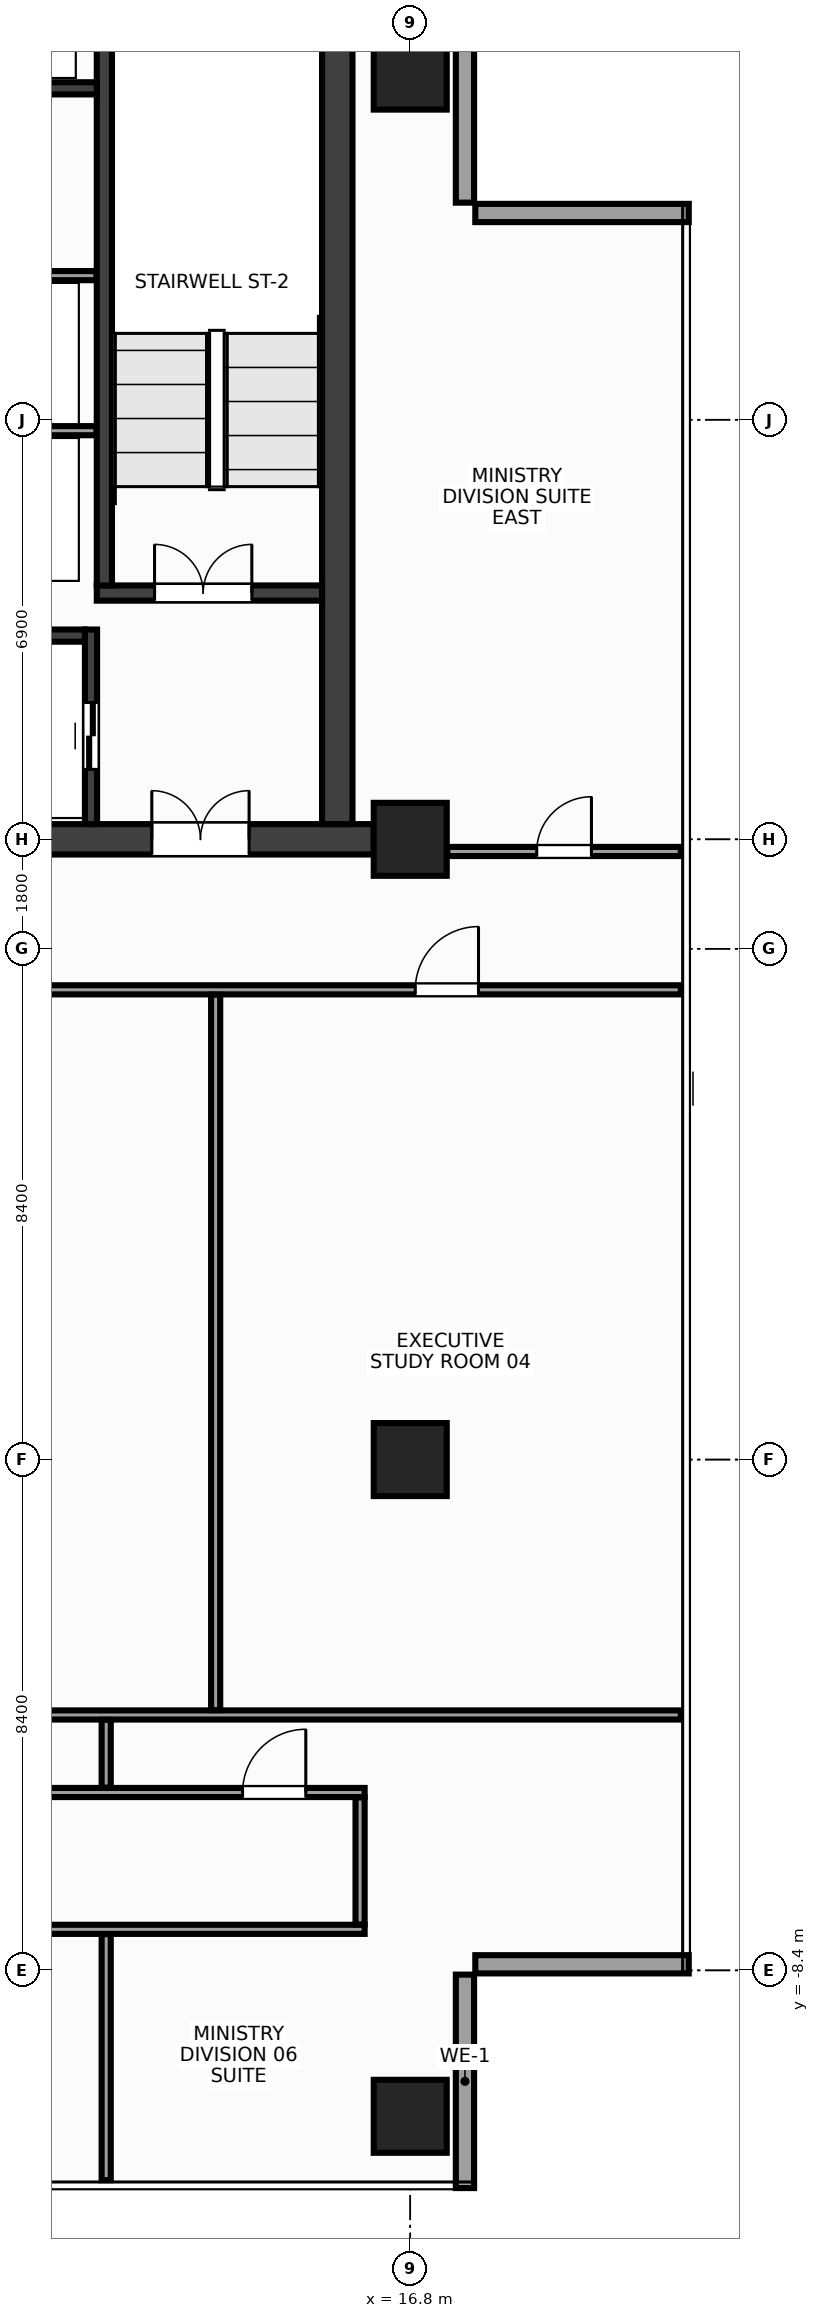
"""IFC4 building model, lengths in metres.
Left out: names, types, materials, properties, quantities, classifications, styles, units other than length and angle.
Written with IfcOpenShell. Run it as: python <this file> out.ifc"""

import sys

from ifc_helpers import new_model, si_unit, direction, frame, frame_2d, origin, origin_2d, place, context, subcontext, project, spatial, rectangle, extrude, source, transform, mapped, element, fill, save


model = new_model("IFC4")
c1 = context("Model", 3, precision=1e-05, world=origin(), true_north=direction((0.0, 1.0)))
c2 = subcontext(c1, "Body", "Model", "MODEL_VIEW")
j1 = project(units=[si_unit("LENGTHUNIT", "METRE"), si_unit("PLANEANGLEUNIT", "RADIAN")], contexts=[c1])
p1 = place(None, origin())
s1 = spatial("IfcSite", under=j1, at=p1, CompositionType="ELEMENT")
p2 = place(p1, origin())
s2 = spatial("IfcBuilding", under=s1, at=p2, CompositionType="ELEMENT")
p3 = place(p2, frame((0.0, 0.0, 282.8)))
s3 = spatial("IfcBuildingStorey", under=s2, at=p3, CompositionType="ELEMENT", Elevation=282.8)
m1 = source(origin(), c2, "Body", "SweptSolid", [
    extrude(rectangle(XDim=32.4, YDim=0.5, at=frame_2d((16.2, 0.0))), origin(), (0.0, 0.0, 1.0), 3.6),
])
p4 = place(p3, frame((-16.2, 10.2, 0.0), z_axis=(0.0, 0.0, 1.0), x_axis=(1.0, 0.0, 0.0)))
e1 = element("IfcWall", 1, at=p4, inside=s3, PredefinedType="SHEAR", context=c2, shape_type="MappedRepresentation", body=[
    mapped(m1, transform((0.0, 0.0, 0.0), x_axis=(1.0, 0.0, 0.0), y_axis=(0.0, 1.0, 0.0), z_axis=(0.0, 0.0, 1.0), scale=1.0)),
])
p5 = place(p4, frame((2.05, 0.0, 0.0)))
e2 = element("IfcOpeningElement", 2, at=p5, cuts=e1, PredefinedType="OPENING", context=c2, shape_type="SweptSolid", body=[
    extrude(rectangle(XDim=1.6, YDim=2.15, at=frame_2d((0.8, 1.075))), frame((0.0, 0.262, 0.0), z_axis=(0.0, -1.0, 0.0), x_axis=(1.0, 0.0, 0.0)), (0.0, 0.0, 1.0), 0.524),
])
p6 = place(p4, frame((28.75, 0.0, 0.0)))
e3 = element("IfcOpeningElement", 3, at=p6, cuts=e1, PredefinedType="OPENING", context=c2, shape_type="SweptSolid", body=[
    extrude(rectangle(XDim=1.6, YDim=2.15, at=frame_2d((0.8, 1.075))), frame((0.0, 0.262, 0.0), z_axis=(0.0, -1.0, 0.0), x_axis=(1.0, 0.0, 0.0)), (0.0, 0.0, 1.0), 0.524),
])
p7 = place(p4, frame((15.45, 0.0, 0.0)))
e4 = element("IfcOpeningElement", 4, at=p7, cuts=e1, PredefinedType="OPENING", context=c2, shape_type="SweptSolid", body=[
    extrude(rectangle(XDim=1.5, YDim=2.2, at=frame_2d((0.75, 1.1))), frame((0.0, 0.262, 0.0), z_axis=(0.0, -1.0, 0.0), x_axis=(1.0, 0.0, 0.0)), (0.0, 0.0, 1.0), 0.524),
])
m2 = source(origin(), c2, "Body", "SweptSolid", [
    extrude(rectangle(XDim=13.1, YDim=0.5, at=frame_2d((6.55, 0.0))), origin(), (0.0, 0.0, 1.0), 3.6),
])
p8 = place(p3, frame((15.6, 10.45, 0.0), z_axis=(0.0, 0.0, 1.0), x_axis=(0.0, 1.0, 0.0)))
e5 = element("IfcWall", 5, at=p8, inside=s3, PredefinedType="SHEAR", context=c2, shape_type="MappedRepresentation", body=[
    mapped(m2, transform((0.0, 0.0, 0.0), x_axis=(1.0, 0.0, 0.0), y_axis=(0.0, 1.0, 0.0), z_axis=(0.0, 0.0, 1.0), scale=1.0)),
])
m3 = source(origin(), c2, "Body", "SweptSolid", [
    extrude(rectangle(XDim=3.705, YDim=0.25, at=frame_2d((1.853, 0.0))), origin(), (0.0, 0.0, 1.0), 3.6),
])
p9 = place(p3, frame((11.645, 14.25, 0.0), z_axis=(0.0, 0.0, 1.0), x_axis=(1.0, 0.0, 0.0)))
e6 = element("IfcWall", 6, at=p9, inside=s3, PredefinedType="SHEAR", context=c2, shape_type="MappedRepresentation", body=[
    mapped(m3, transform((0.0, 0.0, 0.0), x_axis=(1.0, 0.0, 0.0), y_axis=(0.0, 1.0, 0.0), z_axis=(0.0, 0.0, 1.0), scale=1.0)),
])
p10 = place(p9, frame((0.95, 0.0, 0.0)))
e7 = element("IfcOpeningElement", 7, at=p10, cuts=e6, PredefinedType="OPENING", context=c2, shape_type="SweptSolid", body=[
    extrude(rectangle(XDim=1.6, YDim=2.15, at=frame_2d((0.8, 1.075))), frame((0.0, 0.137, 0.0), z_axis=(0.0, -1.0, 0.0), x_axis=(1.0, 0.0, 0.0)), (0.0, 0.0, 1.0), 0.274),
])
m4 = source(origin(), c2, "Body", "SweptSolid", [
    extrude(rectangle(XDim=9.175, YDim=0.25, at=frame_2d((4.587, 0.0))), origin(), (0.0, 0.0, 1.0), 3.6),
])
p11 = place(p3, frame((11.77, 14.375, 0.0), z_axis=(0.0, 0.0, 1.0), x_axis=(0.0, 1.0, 0.0)))
e8 = element("IfcWall", 8, at=p11, inside=s3, PredefinedType="SHEAR", context=c2, shape_type="MappedRepresentation", body=[
    mapped(m4, transform((0.0, 0.0, 0.0), x_axis=(1.0, 0.0, 0.0), y_axis=(0.0, 1.0, 0.0), z_axis=(0.0, 0.0, 1.0), scale=1.0)),
])
m5 = source(origin(), c2, "Body", "SweptSolid", [
    extrude(rectangle(XDim=3.2, YDim=0.2, at=frame_2d((1.6, 0.0))), origin(), (0.0, 0.0, 1.0), 3.6),
])
p12 = place(p3, frame((11.55, 10.45, 0.0), z_axis=(0.0, 0.0, 1.0), x_axis=(0.0, 1.0, 0.0)))
e9 = element("IfcWall", 9, at=p12, inside=s3, PredefinedType="SHEAR", context=c2, shape_type="MappedRepresentation", body=[
    mapped(m5, transform((0.0, 0.0, 0.0), x_axis=(1.0, 0.0, 0.0), y_axis=(0.0, 1.0, 0.0), z_axis=(0.0, 0.0, 1.0), scale=1.0)),
])
p13 = place(p12, frame((0.9, 0.0, 0.0)))
e10 = element("IfcOpeningElement", 10, at=p13, cuts=e9, PredefinedType="OPENING", context=c2, shape_type="SweptSolid", body=[
    extrude(rectangle(XDim=1.1, YDim=2.15, at=frame_2d((0.55, 1.075))), frame((0.0, 0.112, 0.0), z_axis=(0.0, -1.0, 0.0), x_axis=(1.0, 0.0, 0.0)), (0.0, 0.0, 1.0), 0.224),
])
m6 = source(origin(), c2, "Body", "SweptSolid", [
    extrude(rectangle(XDim=2.825, YDim=0.2, at=frame_2d((1.413, 0.0))), origin(), (0.0, 0.0, 1.0), 3.6),
])
p14 = place(p3, frame((8.625, 13.55, 0.0), z_axis=(0.0, 0.0, 1.0), x_axis=(1.0, 0.0, 0.0)))
e11 = element("IfcWall", 11, at=p14, inside=s3, PredefinedType="SHEAR", context=c2, shape_type="MappedRepresentation", body=[
    mapped(m6, transform((0.0, 0.0, 0.0), x_axis=(1.0, 0.0, 0.0), y_axis=(0.0, 1.0, 0.0), z_axis=(0.0, 0.0, 1.0), scale=1.0)),
])
m7 = source(origin(), c2, "Body", "SweptSolid", [
    extrude(rectangle(XDim=3.02, YDim=0.2, at=frame_2d((1.51, 0.0))), origin(), (0.0, 0.0, 1.0), 3.6),
])
p15 = place(p3, frame((8.625, 22.55, 0.0), z_axis=(0.0, 0.0, 1.0), x_axis=(1.0, 0.0, 0.0)))
e12 = element("IfcWall", 12, at=p15, inside=s3, PredefinedType="SHEAR", context=c2, shape_type="MappedRepresentation", body=[
    mapped(m7, transform((0.0, 0.0, 0.0), x_axis=(1.0, 0.0, 0.0), y_axis=(0.0, 1.0, 0.0), z_axis=(0.0, 0.0, 1.0), scale=1.0)),
])
m8 = source(origin(), c2, "Body", "SweptSolid", [
    extrude(rectangle(XDim=1.2, YDim=1.2, at=origin_2d()), origin(), (0.0, 0.0, 1.0), 3.6),
])
for number, where, z_axis, x_axis in (
    (13, (16.8, -10.8, 0.0), (0.0, 0.0, 1.0), (1.0, 0.0, 0.0)),
    (14, (16.8, 0.0, 0.0), (0.0, 0.0, 1.0), (1.0, 0.0, 0.0)),
    (15, (16.8, 10.2, 0.0), (0.0, 0.0, 1.0), (1.0, 0.0, 0.0)),
    (16, (16.8, 22.8, 0.0), (0.0, 0.0, 1.0), (1.0, 0.0, 0.0)),
):
    element("IfcColumn", number, at=place(p3, frame(where, z_axis=z_axis, x_axis=x_axis)), inside=s3, PredefinedType="COLUMN", context=c2, shape_type="MappedRepresentation", body=[
        mapped(m8, transform((0.0, 0.0, 0.0), x_axis=(1.0, 0.0, 0.0), y_axis=(0.0, 1.0, 0.0), z_axis=(0.0, 0.0, 1.0), scale=1.0)),
    ])
m9 = source(origin(), c2, "Body", "SweptSolid", [
    extrude(rectangle(XDim=3.51, YDim=0.3, at=frame_2d((1.755, 0.0))), origin(), (0.0, 0.0, 1.0), 2.75),
])
p16 = place(p3, frame((17.7, -11.98, 0.0), z_axis=(0.0, 0.0, 1.0), x_axis=(0.0, 1.0, 0.0)))
e17 = element("IfcWall", 17, at=p16, inside=s3, PredefinedType="STANDARD", context=c2, shape_type="MappedRepresentation", body=[
    mapped(m9, transform((0.0, 0.0, 0.0), x_axis=(1.0, 0.0, 0.0), y_axis=(0.0, 1.0, 0.0), z_axis=(0.0, 0.0, 1.0), scale=1.0)),
])
m10 = source(origin(), c2, "Body", "SweptSolid", [
    extrude(rectangle(XDim=3.51, YDim=0.3, at=frame_2d((1.755, 0.0))), origin(), (0.0, 0.0, 1.0), 2.75),
])
for number, where, z_axis, x_axis in (
    (18, (17.87, -8.3, 0.0), (0.0, 0.0, 1.0), (1.0, 0.0, 0.0)),
    (19, (21.38, 20.5, 0.0), (0.0, 0.0, 1.0), (-1.0, 0.0, 0.0)),
):
    element("IfcWall", number, at=place(p3, frame(where, z_axis=z_axis, x_axis=x_axis)), inside=s3, PredefinedType="STANDARD", context=c2, shape_type="MappedRepresentation", body=[
        mapped(m10, transform((0.0, 0.0, 0.0), x_axis=(1.0, 0.0, 0.0), y_axis=(0.0, 1.0, 0.0), z_axis=(0.0, 0.0, 1.0), scale=1.0)),
    ])
p17 = place(p3, frame((17.7, 20.67, 0.0), z_axis=(0.0, 0.0, 1.0), x_axis=(0.0, 1.0, 0.0)))
e20 = element("IfcWall", 20, at=p17, inside=s3, PredefinedType="STANDARD", context=c2, shape_type="MappedRepresentation", body=[
    mapped(m9, transform((0.0, 0.0, 0.0), x_axis=(1.0, 0.0, 0.0), y_axis=(0.0, 1.0, 0.0), z_axis=(0.0, 0.0, 1.0), scale=1.0)),
])
m11 = source(origin(), c2, "Body", "SweptSolid", [
    extrude(rectangle(XDim=3.01, YDim=0.15, at=frame_2d((1.505, 0.0))), origin(), (0.0, 0.0, 1.0), 3.37),
])
for number, where, z_axis, x_axis in (
    (21, (8.63, 16.92, 0.0), (0.0, 0.0, 1.0), (1.0, 0.0, 0.0)),
    (22, (8.63, 19.47, 0.0), (0.0, 0.0, 1.0), (1.0, 0.0, 0.0)),
):
    element("IfcWall", number, at=place(p3, frame(where, z_axis=z_axis, x_axis=x_axis)), inside=s3, PredefinedType="PARTITIONING", context=c2, shape_type="MappedRepresentation", body=[
        mapped(m11, transform((0.0, 0.0, 0.0), x_axis=(1.0, 0.0, 0.0), y_axis=(0.0, 1.0, 0.0), z_axis=(0.0, 0.0, 1.0), scale=1.0)),
    ])
m12 = source(origin(), c2, "Body", "SweptSolid", [
    extrude(rectangle(XDim=3.84, YDim=0.15, at=frame_2d((1.92, 0.0))), origin(), (0.0, 0.0, 1.0), 2.805),
])
p18 = place(p3, frame((17.41, 10.0, 0.0), z_axis=(0.0, 0.0, 1.0), x_axis=(1.0, 0.0, 0.0)))
e23 = element("IfcWall", 23, at=p18, inside=s3, PredefinedType="PARTITIONING", context=c2, shape_type="MappedRepresentation", body=[
    mapped(m12, transform((0.0, 0.0, 0.0), x_axis=(1.0, 0.0, 0.0), y_axis=(0.0, 1.0, 0.0), z_axis=(0.0, 0.0, 1.0), scale=1.0)),
])
p19 = place(p18, frame((1.47, 0.0, 0.0)))
e24 = element("IfcOpeningElement", 24, at=p19, cuts=e23, PredefinedType="OPENING", context=c2, shape_type="SweptSolid", body=[
    extrude(rectangle(XDim=0.9, YDim=2.15, at=frame_2d((0.45, 1.075))), frame((0.0, 0.087, 0.0), z_axis=(0.0, -1.0, 0.0), x_axis=(1.0, 0.0, 0.0)), (0.0, 0.0, 1.0), 0.174),
])
m13 = source(origin(), c2, "Body", "SweptSolid", [
    extrude(rectangle(XDim=23.2, YDim=0.15, at=frame_2d((11.6, 0.0))), origin(), (0.0, 0.0, 1.0), 2.755),
])
p20 = place(p3, frame((-1.95, 7.725, 0.0), z_axis=(0.0, 0.0, 1.0), x_axis=(1.0, 0.0, 0.0)))
e25 = element("IfcWall", 25, at=p20, inside=s3, PredefinedType="PARTITIONING", context=c2, shape_type="MappedRepresentation", body=[
    mapped(m13, transform((0.0, 0.0, 0.0), x_axis=(1.0, 0.0, 0.0), y_axis=(0.0, 1.0, 0.0), z_axis=(0.0, 0.0, 1.0), scale=1.0)),
])
p21 = place(p20, frame((7.43, 0.0, 0.0)))
e26 = element("IfcOpeningElement", 26, at=p21, cuts=e25, PredefinedType="OPENING", context=c2, shape_type="SweptSolid", body=[
    extrude(rectangle(XDim=1.04, YDim=2.2, at=frame_2d((0.52, 1.1))), frame((0.0, 0.087, 0.0), z_axis=(0.0, -1.0, 0.0), x_axis=(1.0, 0.0, 0.0)), (0.0, 0.0, 1.0), 0.174),
])
p22 = place(p20, frame((18.833, 0.0, 0.0)))
e27 = element("IfcOpeningElement", 27, at=p22, cuts=e25, PredefinedType="OPENING", context=c2, shape_type="SweptSolid", body=[
    extrude(rectangle(XDim=1.04, YDim=2.2, at=frame_2d((0.52, 1.1))), frame((0.0, 0.087, 0.0), z_axis=(0.0, -1.0, 0.0), x_axis=(1.0, 0.0, 0.0)), (0.0, 0.0, 1.0), 0.174),
])
m14 = source(origin(), c2, "Body", "SweptSolid", [
    extrude(rectangle(XDim=18.0, YDim=0.15, at=frame_2d((9.0, 0.0))), origin(), (0.0, 0.0, 1.0), 2.755),
])
p23 = place(p3, frame((-1.95, -5.475, 0.0), z_axis=(0.0, 0.0, 1.0), x_axis=(1.0, 0.0, 0.0)))
e28 = element("IfcWall", 28, at=p23, inside=s3, PredefinedType="PARTITIONING", context=c2, shape_type="MappedRepresentation", body=[
    mapped(m14, transform((0.0, 0.0, 0.0), x_axis=(1.0, 0.0, 0.0), y_axis=(0.0, 1.0, 0.0), z_axis=(0.0, 0.0, 1.0), scale=1.0)),
])
p24 = place(p23, frame((6.377, 0.0, 0.0)))
e29 = element("IfcOpeningElement", 29, at=p24, cuts=e28, PredefinedType="OPENING", context=c2, shape_type="SweptSolid", body=[
    extrude(rectangle(XDim=1.04, YDim=2.2, at=frame_2d((0.52, 1.1))), frame((0.0, 0.087, 0.0), z_axis=(0.0, -1.0, 0.0), x_axis=(1.0, 0.0, 0.0)), (0.0, 0.0, 1.0), 0.174),
])
p25 = place(p23, frame((15.992, 0.0, 0.0)))
e30 = element("IfcOpeningElement", 30, at=p25, cuts=e28, PredefinedType="OPENING", context=c2, shape_type="SweptSolid", body=[
    extrude(rectangle(XDim=1.04, YDim=2.2, at=frame_2d((0.52, 1.1))), frame((0.0, 0.087, 0.0), z_axis=(0.0, -1.0, 0.0), x_axis=(1.0, 0.0, 0.0)), (0.0, 0.0, 1.0), 0.174),
])
m15 = source(origin(), c2, "Body", "SweptSolid", [
    extrude(rectangle(XDim=32.1, YDim=0.15, at=frame_2d((16.05, 0.0))), origin(), (0.0, 0.0, 1.0), 2.755),
])
p26 = place(p3, frame((-16.05, -7.725, 0.0), z_axis=(0.0, 0.0, 1.0), x_axis=(1.0, 0.0, 0.0)))
e31 = element("IfcWall", 31, at=p26, inside=s3, PredefinedType="PARTITIONING", context=c2, shape_type="MappedRepresentation", body=[
    mapped(m15, transform((0.0, 0.0, 0.0), x_axis=(1.0, 0.0, 0.0), y_axis=(0.0, 1.0, 0.0), z_axis=(0.0, 0.0, 1.0), scale=1.0)),
])
p27 = place(p26, frame((18.83, 0.0, 0.0)))
e32 = element("IfcOpeningElement", 32, at=p27, cuts=e31, PredefinedType="OPENING", context=c2, shape_type="SweptSolid", body=[
    extrude(rectangle(XDim=1.04, YDim=2.2, at=frame_2d((0.52, 1.1))), frame((0.0, 0.087, 0.0), z_axis=(0.0, -1.0, 0.0), x_axis=(1.0, 0.0, 0.0)), (0.0, 0.0, 1.0), 0.174),
])
m16 = source(origin(), c2, "Body", "SweptSolid", [
    extrude(rectangle(XDim=2.09, YDim=0.15, at=frame_2d((1.045, 0.0))), origin(), (0.0, 0.0, 1.0), 3.37),
])
p28 = place(p3, frame((15.975, -7.645, 0.0), z_axis=(0.0, 0.0, 1.0), x_axis=(0.0, 1.0, 0.0)))
e33 = element("IfcWall", 33, at=p28, inside=s3, PredefinedType="PARTITIONING", context=c2, shape_type="MappedRepresentation", body=[
    mapped(m16, transform((0.0, 0.0, 0.0), x_axis=(1.0, 0.0, 0.0), y_axis=(0.0, 1.0, 0.0), z_axis=(0.0, 0.0, 1.0), scale=1.0)),
])
m17 = source(origin(), c2, "Body", "SweptSolid", [
    extrude(rectangle(XDim=23.195, YDim=0.15, at=frame_2d((11.598, 0.0))), origin(), (0.0, 0.0, 1.0), 2.755),
])
p29 = place(p3, frame((-1.945, -4.2, 0.0), z_axis=(0.0, 0.0, 1.0), x_axis=(1.0, 0.0, 0.0)))
e34 = element("IfcWall", 34, at=p29, inside=s3, PredefinedType="PARTITIONING", context=c2, shape_type="MappedRepresentation", body=[
    mapped(m17, transform((0.0, 0.0, 0.0), x_axis=(1.0, 0.0, 0.0), y_axis=(0.0, 1.0, 0.0), z_axis=(0.0, 0.0, 1.0), scale=1.0)),
])
m18 = source(origin(), c2, "Body", "SweptSolid", [
    extrude(rectangle(XDim=11.765, YDim=0.15, at=frame_2d((5.883, 0.0))), origin(), (0.0, 0.0, 1.0), 2.655),
])
p30 = place(p3, frame((13.6, -4.12, 0.0), z_axis=(0.0, 0.0, 1.0), x_axis=(0.0, 1.0, 0.0)))
e35 = element("IfcWall", 35, at=p30, inside=s3, PredefinedType="PARTITIONING", context=c2, shape_type="MappedRepresentation", body=[
    mapped(m18, transform((0.0, 0.0, 0.0), x_axis=(1.0, 0.0, 0.0), y_axis=(0.0, 1.0, 0.0), z_axis=(0.0, 0.0, 1.0), scale=1.0)),
])
m19 = source(origin(), c2, "Body", "SweptSolid", [
    extrude(rectangle(XDim=4.045, YDim=0.15, at=frame_2d((2.022, 0.0))), origin(), (0.0, 0.0, 1.0), 2.905),
])
p31 = place(p3, frame((11.8, -11.85, 0.0), z_axis=(0.0, 0.0, 1.0), x_axis=(0.0, 1.0, 0.0)))
e36 = element("IfcWall", 36, at=p31, inside=s3, PredefinedType="PARTITIONING", context=c2, shape_type="MappedRepresentation", body=[
    mapped(m19, transform((0.0, 0.0, 0.0), x_axis=(1.0, 0.0, 0.0), y_axis=(0.0, 1.0, 0.0), z_axis=(0.0, 0.0, 1.0), scale=1.0)),
])
m20 = source(origin(), c2, "Body", "SweptSolid", [
    extrude(rectangle(XDim=1.115, YDim=0.15, at=frame_2d((0.558, 0.0))), origin(), (0.0, 0.0, 1.0), 3.37),
])
p32 = place(p3, frame((11.8, -5.395, 0.0), z_axis=(0.0, 0.0, 1.0), x_axis=(0.0, 1.0, 0.0)))
e37 = element("IfcWall", 37, at=p32, inside=s3, PredefinedType="PARTITIONING", context=c2, shape_type="MappedRepresentation", body=[
    mapped(m20, transform((0.0, 0.0, 0.0), x_axis=(1.0, 0.0, 0.0), y_axis=(0.0, 1.0, 0.0), z_axis=(0.0, 0.0, 1.0), scale=1.0)),
])
m21 = source(origin(), c2, "Body", "SweptSolid", [
    extrude(rectangle(XDim=1.6, YDim=2.15, at=frame_2d((0.8, 1.075))), frame((0.0, 0.025, 0.0), z_axis=(0.0, -1.0, 0.0), x_axis=(1.0, 0.0, 0.0)), (0.0, 0.0, 1.0), 0.05),
])
p33 = place(p10, origin())
e38 = element("IfcDoor", 38, at=p33, inside=s3, OperationType="DOUBLE_DOOR_SINGLE_SWING", PredefinedType="DOOR", context=c2, shape_type="MappedRepresentation", body=[
    mapped(m21, transform((0.0, 0.0, 0.0), x_axis=(1.0, 0.0, 0.0), y_axis=(0.0, 1.0, 0.0), z_axis=(0.0, 0.0, 1.0), scale=1.0)),
])
fill(e7, e38)
p34 = place(p6, origin())
e39 = element("IfcDoor", 39, at=p34, inside=s3, OperationType="DOUBLE_DOOR_SINGLE_SWING", PredefinedType="DOOR", context=c2, shape_type="MappedRepresentation", body=[
    mapped(m21, transform((0.0, 0.0, 0.0), x_axis=(1.0, 0.0, 0.0), y_axis=(0.0, 1.0, 0.0), z_axis=(0.0, 0.0, 1.0), scale=1.0)),
])
fill(e3, e39)
m22 = source(origin(), c2, "Body", "SweptSolid", [
    extrude(rectangle(XDim=1.1, YDim=2.15, at=frame_2d((0.55, 1.075))), frame((0.0, 0.025, 0.0), z_axis=(0.0, -1.0, 0.0), x_axis=(1.0, 0.0, 0.0)), (0.0, 0.0, 1.0), 0.05),
])
p35 = place(p13, origin())
e40 = element("IfcDoor", 40, at=p35, inside=s3, OperationType="DOUBLE_DOOR_SLIDING", PredefinedType="DOOR", context=c2, shape_type="MappedRepresentation", body=[
    mapped(m22, transform((0.0, 0.0, 0.0), x_axis=(1.0, 0.0, 0.0), y_axis=(0.0, 1.0, 0.0), z_axis=(0.0, 0.0, 1.0), scale=1.0)),
])
fill(e10, e40)
m23 = source(origin(), c2, "Body", "SweptSolid", [
    extrude(rectangle(XDim=0.9, YDim=2.15, at=frame_2d((0.45, 1.075))), frame((0.0, 0.025, 0.0), z_axis=(0.0, -1.0, 0.0), x_axis=(1.0, 0.0, 0.0)), (0.0, 0.0, 1.0), 0.05),
])
p36 = place(p19, origin())
e41 = element("IfcDoor", 41, at=p36, inside=s3, OperationType="SINGLE_SWING_RIGHT", PredefinedType="DOOR", context=c2, shape_type="MappedRepresentation", body=[
    mapped(m23, transform((0.0, 0.0, 0.0), x_axis=(1.0, 0.0, 0.0), y_axis=(0.0, 1.0, 0.0), z_axis=(0.0, 0.0, 1.0), scale=1.0)),
])
fill(e24, e41)
m24 = source(origin(), c2, "Body", "SweptSolid", [
    extrude(rectangle(XDim=1.04, YDim=2.2, at=frame_2d((0.52, 1.1))), frame((0.0, 0.025, 0.0), z_axis=(0.0, -1.0, 0.0), x_axis=(1.0, 0.0, 0.0)), (0.0, 0.0, 1.0), 0.05),
])
p37 = place(p22, origin())
e42 = element("IfcDoor", 42, at=p37, inside=s3, OperationType="SINGLE_SWING_RIGHT", PredefinedType="DOOR", context=c2, shape_type="MappedRepresentation", body=[
    mapped(m24, transform((0.0, 0.0, 0.0), x_axis=(1.0, 0.0, 0.0), y_axis=(0.0, 1.0, 0.0), z_axis=(0.0, 0.0, 1.0), scale=1.0)),
])
fill(e27, e42)
p38 = place(p25, origin())
e43 = element("IfcDoor", 43, at=p38, inside=s3, OperationType="SINGLE_SWING_RIGHT", PredefinedType="DOOR", context=c2, shape_type="MappedRepresentation", body=[
    mapped(m24, transform((0.0, 0.0, 0.0), x_axis=(1.0, 0.0, 0.0), y_axis=(0.0, 1.0, 0.0), z_axis=(0.0, 0.0, 1.0), scale=1.0)),
])
fill(e30, e43)
save(model, sys.argv[1])
